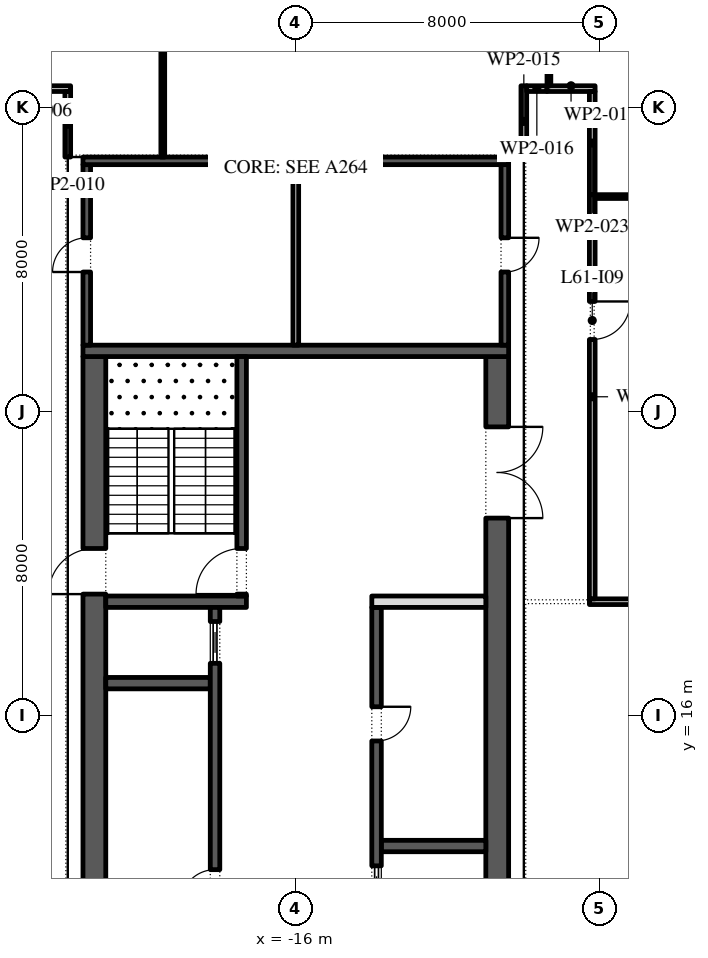
"""IFC4 building model, lengths in metres.
Left out: names, types, materials, properties, quantities, classifications, styles, units other than length and angle.
Written with IfcOpenShell. Run it as: python <this file> out.ifc"""

import sys

from ifc_helpers import new_model, si_unit, direction, frame, frame_2d, origin, place, context, subcontext, project, spatial, rectangle, extrude, element, fill, save


model = new_model("IFC4")
c1 = context("Model", 3, precision=1e-05, world=origin(), true_north=direction((0.0, 1.0)))
c2 = subcontext(c1, "Body", "Model", "MODEL_VIEW")
j1 = project(units=[si_unit("LENGTHUNIT", "METRE"), si_unit("PLANEANGLEUNIT", "RADIAN")], contexts=[c1])
p1 = place(None, origin())
s1 = spatial("IfcSite", under=j1, at=p1, CompositionType="ELEMENT")
p2 = place(p1, origin())
s2 = spatial("IfcBuilding", under=s1, at=p2, CompositionType="ELEMENT")
p3 = place(p2, frame((0.0, 0.0, 280.8)))
s3 = spatial("IfcBuildingStorey", under=s2, at=p3, CompositionType="ELEMENT", Elevation=280.8)
p4 = place(p3, frame((-21.359, 48.678, 0.0), z_axis=(0.0, 0.0, 1.0), x_axis=(-0.224949198343, -0.974370493275, 0.0)))
e1 = element("IfcWall", 1, at=p4, inside=s3, PredefinedType="STANDARD", context=c2, shape_type="SweptSolid", body=[
    extrude(rectangle(XDim=49.5, YDim=0.3, at=frame_2d((24.75, 0.0))), origin(), (0.0, 0.0, 1.0), 4.0),
])
p5 = place(p4, frame((1.157, 0.0, 0.45)))
e2 = element("IfcOpeningElement", 2, at=p5, cuts=e1, PredefinedType="OPENING", context=c2, shape_type="SweptSolid", body=[
    extrude(rectangle(XDim=4.5, YDim=3.05, at=frame_2d((2.25, 1.525))), frame((0.0, 0.16, 0.0), z_axis=(0.0, -1.0, 0.0), x_axis=(1.0, 0.0, 0.0)), (0.0, 0.0, 1.0), 0.32),
])
p6 = place(p4, frame((9.171, 0.0, 0.0)))
e3 = element("IfcOpeningElement", 3, at=p6, cuts=e1, PredefinedType="OPENING", context=c2, shape_type="SweptSolid", body=[
    extrude(rectangle(XDim=2.4, YDim=3.5, at=frame_2d((1.2, 1.75))), frame((0.0, 0.16, 0.0), z_axis=(0.0, -1.0, 0.0), x_axis=(1.0, 0.0, 0.0)), (0.0, 0.0, 1.0), 0.32),
])
p7 = place(p4, frame((15.236, 0.0, 0.45)))
e4 = element("IfcOpeningElement", 4, at=p7, cuts=e1, PredefinedType="OPENING", context=c2, shape_type="SweptSolid", body=[
    extrude(rectangle(XDim=4.5, YDim=3.05, at=frame_2d((2.25, 1.525))), frame((0.0, 0.16, 0.0), z_axis=(0.0, -1.0, 0.0), x_axis=(1.0, 0.0, 0.0)), (0.0, 0.0, 1.0), 0.32),
])
p8 = place(p4, frame((22.35, 0.0, 0.45)))
e5 = element("IfcOpeningElement", 5, at=p8, cuts=e1, PredefinedType="OPENING", context=c2, shape_type="SweptSolid", body=[
    extrude(rectangle(XDim=4.5, YDim=3.05, at=frame_2d((2.25, 1.525))), frame((0.0, 0.16, 0.0), z_axis=(0.0, -1.0, 0.0), x_axis=(1.0, 0.0, 0.0)), (0.0, 0.0, 1.0), 0.32),
])
p9 = place(p4, frame((29.464, 0.0, 0.45)))
e6 = element("IfcOpeningElement", 6, at=p9, cuts=e1, PredefinedType="OPENING", context=c2, shape_type="SweptSolid", body=[
    extrude(rectangle(XDim=4.5, YDim=3.05, at=frame_2d((2.25, 1.525))), frame((0.0, 0.16, 0.0), z_axis=(0.0, -1.0, 0.0), x_axis=(1.0, 0.0, 0.0)), (0.0, 0.0, 1.0), 0.32),
])
p10 = place(p4, frame((37.628, 0.0, 0.0)))
e7 = element("IfcOpeningElement", 7, at=p10, cuts=e1, PredefinedType="OPENING", context=c2, shape_type="SweptSolid", body=[
    extrude(rectangle(XDim=2.4, YDim=3.325, at=frame_2d((1.2, 1.663))), frame((0.0, 0.16, 0.0), z_axis=(0.0, -1.0, 0.0), x_axis=(1.0, 0.0, 0.0)), (0.0, 0.0, 1.0), 0.32),
])
p11 = place(p4, frame((43.693, 0.0, 0.45)))
e8 = element("IfcOpeningElement", 8, at=p11, cuts=e1, PredefinedType="OPENING", context=c2, shape_type="SweptSolid", body=[
    extrude(rectangle(XDim=4.5, YDim=2.825, at=frame_2d((2.25, 1.413))), frame((0.0, 0.16, 0.0), z_axis=(0.0, -1.0, 0.0), x_axis=(1.0, 0.0, 0.0)), (0.0, 0.0, 1.0), 0.32),
])
p12 = place(p3, frame((-21.3, -2.45, 0.0), z_axis=(0.0, 0.0, 1.0), x_axis=(0.0, 1.0, 0.0)))
e9 = element("IfcWall", 9, at=p12, inside=s3, PredefinedType="SHEAR", context=c2, shape_type="SweptSolid", body=[
    extrude(rectangle(XDim=27.9, YDim=0.6, at=frame_2d((13.95, 0.0))), origin(), (0.0, 0.0, 1.0), 4.0),
])
p13 = place(p12, frame((5.05, 0.0, 0.0)))
e10 = element("IfcOpeningElement", 10, at=p13, cuts=e9, PredefinedType="OPENING", context=c2, shape_type="SweptSolid", body=[
    extrude(rectangle(XDim=1.2, YDim=2.1, at=frame_2d((0.6, 1.05))), frame((0.0, 0.31, 0.0), z_axis=(0.0, -1.0, 0.0), x_axis=(1.0, 0.0, 0.0)), (0.0, 0.0, 1.0), 0.62),
])
p14 = place(p12, frame((21.65, 0.0, 0.0)))
e11 = element("IfcOpeningElement", 11, at=p14, cuts=e9, PredefinedType="OPENING", context=c2, shape_type="SweptSolid", body=[
    extrude(rectangle(XDim=1.2, YDim=2.1, at=frame_2d((0.6, 1.05))), frame((0.0, 0.31, 0.0), z_axis=(0.0, -1.0, 0.0), x_axis=(1.0, 0.0, 0.0)), (0.0, 0.0, 1.0), 0.62),
])
p15 = place(p3, frame((-10.7, -2.45, 0.0), z_axis=(0.0, 0.0, 1.0), x_axis=(0.0, 1.0, 0.0)))
e12 = element("IfcWall", 12, at=p15, inside=s3, PredefinedType="SHEAR", context=c2, shape_type="SweptSolid", body=[
    extrude(rectangle(XDim=27.9, YDim=0.6, at=frame_2d((13.95, 0.0))), origin(), (0.0, 0.0, 1.0), 4.0),
])
p16 = place(p15, frame((23.65, 0.0, 0.0)))
e13 = element("IfcOpeningElement", 13, at=p16, cuts=e12, PredefinedType="OPENING", context=c2, shape_type="SweptSolid", body=[
    extrude(rectangle(XDim=2.4, YDim=2.1, at=frame_2d((1.2, 1.05))), frame((0.0, 0.31, 0.0), z_axis=(0.0, -1.0, 0.0), x_axis=(1.0, 0.0, 0.0)), (0.0, 0.0, 1.0), 0.62),
])
p17 = place(p15, frame((1.087, 0.0, 0.0)))
e14 = element("IfcOpeningElement", 14, at=p17, cuts=e12, PredefinedType="OPENING", context=c2, shape_type="SweptSolid", body=[
    extrude(rectangle(XDim=0.9, YDim=2.1, at=frame_2d((0.45, 1.05))), frame((0.0, 0.31, 0.0), z_axis=(0.0, -1.0, 0.0), x_axis=(1.0, 0.0, 0.0)), (0.0, 0.0, 1.0), 0.62),
])
p18 = place(p15, frame((4.262, 0.0, 0.0)))
e15 = element("IfcOpeningElement", 15, at=p18, cuts=e12, PredefinedType="OPENING", context=c2, shape_type="SweptSolid", body=[
    extrude(rectangle(XDim=1.0, YDim=2.1, at=frame_2d((0.5, 1.05))), frame((0.0, 0.31, 0.0), z_axis=(0.0, -1.0, 0.0), x_axis=(1.0, 0.0, 0.0)), (0.0, 0.0, 1.0), 0.62),
])
p19 = place(p3, frame((-21.6, 25.6, 0.0), z_axis=(0.0, 0.0, 1.0), x_axis=(1.0, 0.0, 0.0)))
e16 = element("IfcWall", 16, at=p19, inside=s3, PredefinedType="SHEAR", context=c2, shape_type="SweptSolid", body=[
    extrude(rectangle(XDim=11.2, YDim=0.3, at=frame_2d((5.6, 0.0))), origin(), (0.0, 0.0, 1.0), 4.0),
])
p20 = place(p3, frame((-21.0, 19.0, 0.0), z_axis=(0.0, 0.0, 1.0), x_axis=(1.0, 0.0, 0.0)))
e17 = element("IfcWall", 17, at=p20, inside=s3, PredefinedType="SHEAR", context=c2, shape_type="SweptSolid", body=[
    extrude(rectangle(XDim=3.7, YDim=0.3, at=frame_2d((1.85, 0.0))), origin(), (0.0, 0.0, 1.0), 4.0),
])
p21 = place(p3, frame((-17.425, 19.15, 0.0), z_axis=(0.0, 0.0, 1.0), x_axis=(0.0, 1.0, 0.0)))
e18 = element("IfcWall", 18, at=p21, inside=s3, PredefinedType="SHEAR", context=c2, shape_type="SweptSolid", body=[
    extrude(rectangle(XDim=6.3, YDim=0.25, at=frame_2d((3.15, 0.0))), origin(), (0.0, 0.0, 1.0), 4.0),
])
p22 = place(p21, frame((0.05, 0.0, 0.0)))
e19 = element("IfcOpeningElement", 19, at=p22, cuts=e18, PredefinedType="OPENING", context=c2, shape_type="SweptSolid", body=[
    extrude(rectangle(XDim=1.2, YDim=2.1, at=frame_2d((0.6, 1.05))), frame((0.0, 0.135, 0.0), z_axis=(0.0, -1.0, 0.0), x_axis=(1.0, 0.0, 0.0)), (0.0, 0.0, 1.0), 0.27),
])
p23 = place(p3, frame((-21.0, 16.857, 0.0), z_axis=(0.0, 0.0, 1.0), x_axis=(1.0, 0.0, 0.0)))
e20 = element("IfcWall", 20, at=p23, inside=s3, PredefinedType="SHEAR", context=c2, shape_type="SweptSolid", body=[
    extrude(rectangle(XDim=2.75, YDim=0.3, at=frame_2d((1.375, 0.0))), origin(), (0.0, 0.0, 1.0), 4.0),
])
p24 = place(p3, frame((-18.125, 4.15, 0.0), z_axis=(0.0, 0.0, 1.0), x_axis=(0.0, 1.0, 0.0)))
e21 = element("IfcWall", 21, at=p24, inside=s3, PredefinedType="SHEAR", context=c2, shape_type="SweptSolid", body=[
    extrude(rectangle(XDim=14.7, YDim=0.25, at=frame_2d((7.35, 0.0))), origin(), (0.0, 0.0, 1.0), 4.0),
])
p25 = place(p24, frame((6.9, 0.0, 0.0)))
e22 = element("IfcOpeningElement", 22, at=p25, cuts=e21, PredefinedType="OPENING", context=c2, shape_type="SweptSolid", body=[
    extrude(rectangle(XDim=0.9, YDim=2.1, at=frame_2d((0.45, 1.05))), frame((0.0, 0.135, 0.0), z_axis=(0.0, -1.0, 0.0), x_axis=(1.0, 0.0, 0.0)), (0.0, 0.0, 1.0), 0.27),
])
p26 = place(p24, frame((0.371, 0.0, 0.0)))
e23 = element("IfcOpeningElement", 23, at=p26, cuts=e21, PredefinedType="OPENING", context=c2, shape_type="SweptSolid", body=[
    extrude(rectangle(XDim=1.1, YDim=2.1, at=frame_2d((0.55, 1.05))), frame((0.0, 0.135, 0.0), z_axis=(0.0, -1.0, 0.0), x_axis=(1.0, 0.0, 0.0)), (0.0, 0.0, 1.0), 0.27),
])
p27 = place(p24, frame((13.229, 0.0, 0.0)))
e24 = element("IfcOpeningElement", 24, at=p27, cuts=e21, PredefinedType="OPENING", context=c2, shape_type="SweptSolid", body=[
    extrude(rectangle(XDim=1.1, YDim=2.1, at=frame_2d((0.55, 1.05))), frame((0.0, 0.135, 0.0), z_axis=(0.0, -1.0, 0.0), x_axis=(1.0, 0.0, 0.0)), (0.0, 0.0, 1.0), 0.27),
])
p28 = place(p3, frame((-13.75, 12.571, 0.0), z_axis=(0.0, 0.0, 1.0), x_axis=(1.0, 0.0, 0.0)))
e25 = element("IfcWall", 25, at=p28, inside=s3, PredefinedType="SHEAR", context=c2, shape_type="SweptSolid", body=[
    extrude(rectangle(XDim=2.75, YDim=0.3, at=frame_2d((1.375, 0.0))), origin(), (0.0, 0.0, 1.0), 4.0),
])
p29 = place(p3, frame((-13.875, -2.45, 0.0), z_axis=(0.0, 0.0, 1.0), x_axis=(0.0, 1.0, 0.0)))
e26 = element("IfcWall", 26, at=p29, inside=s3, PredefinedType="SHEAR", context=c2, shape_type="SweptSolid", body=[
    extrude(rectangle(XDim=21.3, YDim=0.25, at=frame_2d((10.65, 0.0))), origin(), (0.0, 0.0, 1.0), 4.0),
])
p30 = place(p29, frame((17.786, 0.0, 0.0)))
e27 = element("IfcOpeningElement", 27, at=p30, cuts=e26, PredefinedType="OPENING", context=c2, shape_type="SweptSolid", body=[
    extrude(rectangle(XDim=0.9, YDim=2.1, at=frame_2d((0.45, 1.05))), frame((0.0, 0.135, 0.0), z_axis=(0.0, -1.0, 0.0), x_axis=(1.0, 0.0, 0.0)), (0.0, 0.0, 1.0), 0.27),
])
p31 = place(p29, frame((6.971, 0.0, 0.0)))
e28 = element("IfcOpeningElement", 28, at=p31, cuts=e26, PredefinedType="OPENING", context=c2, shape_type="SweptSolid", body=[
    extrude(rectangle(XDim=1.1, YDim=2.1, at=frame_2d((0.55, 1.05))), frame((0.0, 0.135, 0.0), z_axis=(0.0, -1.0, 0.0), x_axis=(1.0, 0.0, 0.0)), (0.0, 0.0, 1.0), 0.27),
])
p32 = place(p29, frame((9.114, 0.0, 0.0)))
e29 = element("IfcOpeningElement", 29, at=p32, cuts=e26, PredefinedType="OPENING", context=c2, shape_type="SweptSolid", body=[
    extrude(rectangle(XDim=1.1, YDim=2.1, at=frame_2d((0.55, 1.05))), frame((0.0, 0.135, 0.0), z_axis=(0.0, -1.0, 0.0), x_axis=(1.0, 0.0, 0.0)), (0.0, 0.0, 1.0), 0.27),
])
p33 = place(p29, frame((11.257, 0.0, 0.0)))
e30 = element("IfcOpeningElement", 30, at=p33, cuts=e26, PredefinedType="OPENING", context=c2, shape_type="SweptSolid", body=[
    extrude(rectangle(XDim=1.1, YDim=2.1, at=frame_2d((0.55, 1.05))), frame((0.0, 0.135, 0.0), z_axis=(0.0, -1.0, 0.0), x_axis=(1.0, 0.0, 0.0)), (0.0, 0.0, 1.0), 0.27),
])
p34 = place(p29, frame((13.4, 0.0, 0.0)))
e31 = element("IfcOpeningElement", 31, at=p34, cuts=e26, PredefinedType="OPENING", context=c2, shape_type="SweptSolid", body=[
    extrude(rectangle(XDim=1.1, YDim=2.1, at=frame_2d((0.55, 1.05))), frame((0.0, 0.135, 0.0), z_axis=(0.0, -1.0, 0.0), x_axis=(1.0, 0.0, 0.0)), (0.0, 0.0, 1.0), 0.27),
])
p35 = place(p3, frame((-14.0, 19.0, 0.0), z_axis=(0.0, 0.0, 1.0), x_axis=(1.0, 0.0, 0.0)))
e32 = element("IfcWall", 32, at=p35, inside=s3, PredefinedType="PARTITIONING", context=c2, shape_type="SweptSolid", body=[
    extrude(rectangle(XDim=3.0, YDim=0.3, at=frame_2d((1.5, 0.0))), origin(), (0.0, 0.0, 1.0), 4.0),
])
p36 = place(p3, frame((-21.5, 25.75, 0.0), z_axis=(0.0, 0.0, 1.0), x_axis=(0.0, 1.0, 0.0)))
e33 = element("IfcWall", 33, at=p36, inside=s3, PredefinedType="SHEAR", context=c2, shape_type="SweptSolid", body=[
    extrude(rectangle(XDim=4.75, YDim=0.2, at=frame_2d((2.375, 0.0))), origin(), (0.0, 0.0, 1.0), 4.0),
])
p37 = place(p36, frame((1.925, 0.0, 0.0)))
e34 = element("IfcOpeningElement", 34, at=p37, cuts=e33, PredefinedType="OPENING", context=c2, shape_type="SweptSolid", body=[
    extrude(rectangle(XDim=0.9, YDim=2.1, at=frame_2d((0.45, 1.05))), frame((0.0, 0.11, 0.0), z_axis=(0.0, -1.0, 0.0), x_axis=(1.0, 0.0, 0.0)), (0.0, 0.0, 1.0), 0.22),
])
p38 = place(p3, frame((-10.5, 25.75, 0.0), z_axis=(0.0, 0.0, 1.0), x_axis=(0.0, 1.0, 0.0)))
e35 = element("IfcWall", 35, at=p38, inside=s3, PredefinedType="SHEAR", context=c2, shape_type="SweptSolid", body=[
    extrude(rectangle(XDim=4.75, YDim=0.2, at=frame_2d((2.375, 0.0))), origin(), (0.0, 0.0, 1.0), 4.0),
])
p39 = place(p38, frame((1.925, 0.0, 0.0)))
e36 = element("IfcOpeningElement", 36, at=p39, cuts=e35, PredefinedType="OPENING", context=c2, shape_type="SweptSolid", body=[
    extrude(rectangle(XDim=0.9, YDim=2.1, at=frame_2d((0.45, 1.05))), frame((0.0, 0.11, 0.0), z_axis=(0.0, -1.0, 0.0), x_axis=(1.0, 0.0, 0.0)), (0.0, 0.0, 1.0), 0.22),
])
p40 = place(p3, frame((-21.6, 30.6, 0.0), z_axis=(0.0, 0.0, 1.0), x_axis=(1.0, 0.0, 0.0)))
e37 = element("IfcWall", 37, at=p40, inside=s3, PredefinedType="SHEAR", context=c2, shape_type="SweptSolid", body=[
    extrude(rectangle(XDim=11.2, YDim=0.2, at=frame_2d((5.6, 0.0))), origin(), (0.0, 0.0, 1.0), 4.0),
])
p41 = place(p3, frame((-16.0, 25.75, 0.0), z_axis=(0.0, 0.0, 1.0), x_axis=(0.0, 1.0, 0.0)))
e38 = element("IfcWall", 38, at=p41, inside=s3, PredefinedType="PARTITIONING", context=c2, shape_type="SweptSolid", body=[
    extrude(rectangle(XDim=4.75, YDim=0.15, at=frame_2d((2.375, 0.0))), origin(), (0.0, 0.0, 1.0), 4.0),
])
p42 = place(p3, frame((-23.8, 32.5, 0.0), z_axis=(0.0, 0.0, 1.0), x_axis=(1.0, 0.0, 0.0)))
e39 = element("IfcWall", 39, at=p42, inside=s3, PredefinedType="PARTITIONING", context=c2, shape_type="SweptSolid", body=[
    extrude(rectangle(XDim=1.875, YDim=0.15, at=frame_2d((0.938, 0.0))), origin(), (0.0, 0.0, 1.0), 4.0),
])
p43 = place(p3, frame((-22.0, 32.425, 0.0), z_axis=(0.0, 0.0, 1.0), x_axis=(0.0, -1.0, 0.0)))
e40 = element("IfcWall", 40, at=p43, inside=s3, PredefinedType="PARTITIONING", context=c2, shape_type="SweptSolid", body=[
    extrude(rectangle(XDim=1.725, YDim=0.15, at=frame_2d((0.863, 0.0))), origin(), (0.0, 0.0, 1.0), 4.0),
])
p44 = place(p3, frame((-19.5, 41.95, 0.0), z_axis=(0.0, 0.0, 1.0), x_axis=(0.0, -1.0, 0.0)))
e41 = element("IfcWall", 41, at=p44, inside=s3, PredefinedType="PARTITIONING", context=c2, shape_type="SweptSolid", body=[
    extrude(rectangle(XDim=11.25, YDim=0.1, at=frame_2d((5.625, 0.0))), origin(), (0.0, 0.0, 1.0), 4.0),
])
p45 = place(p3, frame((-10.0, 30.7, 0.0), z_axis=(0.0, 0.0, 1.0), x_axis=(0.0, 1.0, 0.0)))
e42 = element("IfcWall", 42, at=p45, inside=s3, PredefinedType="PARTITIONING", context=c2, shape_type="SweptSolid", body=[
    extrude(rectangle(XDim=1.875, YDim=0.15, at=frame_2d((0.938, 0.0))), origin(), (0.0, 0.0, 1.0), 4.0),
])
p46 = place(p3, frame((-9.925, 32.5, 0.0), z_axis=(0.0, 0.0, 1.0), x_axis=(1.0, 0.0, 0.0)))
e43 = element("IfcWall", 43, at=p46, inside=s3, PredefinedType="PARTITIONING", context=c2, shape_type="SweptSolid", body=[
    extrude(rectangle(XDim=0.535, YDim=0.15, at=frame_2d((0.268, 0.0))), origin(), (0.0, 0.0, 1.0), 4.0),
])
p47 = place(p3, frame((-9.39, 32.5, 0.0), z_axis=(0.0, 0.0, 1.0), x_axis=(1.0, 0.0, 0.0)))
e44 = element("IfcWall", 44, at=p47, inside=s3, PredefinedType="PARTITIONING", context=c2, shape_type="SweptSolid", body=[
    extrude(rectangle(XDim=1.265, YDim=0.15, at=frame_2d((0.632, 0.0))), origin(), (0.0, 0.0, 1.0), 4.0),
])
p48 = place(p3, frame((-9.34, 41.95, 0.0), z_axis=(0.0, 0.0, 1.0), x_axis=(0.0, -1.0, 0.0)))
e45 = element("IfcWall", 45, at=p48, inside=s3, PredefinedType="PARTITIONING", context=c2, shape_type="SweptSolid", body=[
    extrude(rectangle(XDim=9.375, YDim=0.1, at=frame_2d((4.688, 0.0))), origin(), (0.0, 0.0, 1.0), 4.0),
])
p49 = place(p3, frame((-8.275, 19.0, 0.0), z_axis=(0.0, 0.0, 1.0), x_axis=(1.0, 0.0, 0.0)))
e46 = element("IfcWall", 46, at=p49, inside=s3, PredefinedType="PARTITIONING", context=c2, shape_type="SweptSolid", body=[
    extrude(rectangle(XDim=7.36, YDim=0.15, at=frame_2d((3.68, 0.0))), origin(), (0.0, 0.0, 1.0), 4.0),
])
p50 = place(p3, frame((-8.2, 29.71, 0.0), z_axis=(0.0, 0.0, 1.0), x_axis=(0.0, -1.0, 0.0)))
e47 = element("IfcWall", 47, at=p50, inside=s3, PredefinedType="PARTITIONING", context=c2, shape_type="SweptSolid", body=[
    extrude(rectangle(XDim=10.635, YDim=0.15, at=frame_2d((5.317, 0.0))), origin(), (0.0, 0.0, 1.0), 4.0),
])
p51 = place(p50, frame((2.81, 0.0, 0.0)))
e48 = element("IfcOpeningElement", 48, at=p51, cuts=e47, PredefinedType="OPENING", context=c2, shape_type="SweptSolid", body=[
    extrude(rectangle(XDim=1.0, YDim=2.1, at=frame_2d((0.5, 1.05))), frame((0.0, 0.085, 0.0), z_axis=(0.0, -1.0, 0.0), x_axis=(1.0, 0.0, 0.0)), (0.0, 0.0, 1.0), 0.17),
])
p52 = place(p3, frame((-8.125, 29.66, 0.0), z_axis=(0.0, 0.0, 1.0), x_axis=(1.0, 0.0, 0.0)))
e49 = element("IfcWall", 49, at=p52, inside=s3, PredefinedType="PARTITIONING", context=c2, shape_type="SweptSolid", body=[
    extrude(rectangle(XDim=7.21, YDim=0.1, at=frame_2d((3.605, 0.0))), origin(), (0.0, 0.0, 1.0), 4.0),
])
p53 = place(p3, frame((-8.2, 32.425, 0.0), z_axis=(0.0, 0.0, 1.0), x_axis=(0.0, -1.0, 0.0)))
e50 = element("IfcWall", 50, at=p53, inside=s3, PredefinedType="PARTITIONING", context=c2, shape_type="SweptSolid", body=[
    extrude(rectangle(XDim=2.715, YDim=0.15, at=frame_2d((1.357, 0.0))), origin(), (0.0, 0.0, 1.0), 4.0),
])
p54 = place(p25, origin())
e51 = element("IfcDoor", 51, at=p54, inside=s3, OperationType="SINGLE_SWING_RIGHT", PredefinedType="DOOR", context=c2, shape_type="SweptSolid", body=[
    extrude(rectangle(XDim=0.9, YDim=2.1, at=frame_2d((0.45, 1.05))), frame((0.0, 0.125, 0.0), z_axis=(0.0, -1.0, 0.0), x_axis=(1.0, 0.0, 0.0)), (0.0, 0.0, 1.0), 0.05),
])
fill(e22, e51)
p55 = place(p27, origin())
e52 = element("IfcDoor", 52, at=p55, inside=s3, OperationType="SLIDING_TO_LEFT", PredefinedType="DOOR", context=c2, shape_type="SweptSolid", body=[
    extrude(rectangle(XDim=1.1, YDim=2.1, at=frame_2d((0.55, 1.05))), frame((0.0, 0.025, 0.0), z_axis=(0.0, -1.0, 0.0), x_axis=(1.0, 0.0, 0.0)), (0.0, 0.0, 1.0), 0.05),
])
fill(e24, e52)
p56 = place(p30, frame((0.9, -0.2, 0.0), z_axis=(0.0, 0.0, 1.0), x_axis=(-1.0, 0.0, 0.0)))
e53 = element("IfcDoor", 53, at=p56, inside=s3, OperationType="SINGLE_SWING_RIGHT", PredefinedType="DOOR", context=c2, shape_type="SweptSolid", body=[
    extrude(rectangle(XDim=0.9, YDim=2.1, at=frame_2d((0.45, 1.05))), frame((0.0, -0.075, 0.0), z_axis=(0.0, -1.0, 0.0), x_axis=(1.0, 0.0, 0.0)), (0.0, 0.0, 1.0), 0.05),
])
fill(e27, e53)
p57 = place(p34, origin())
e54 = element("IfcDoor", 54, at=p57, inside=s3, OperationType="SLIDING_TO_LEFT", PredefinedType="DOOR", context=c2, shape_type="SweptSolid", body=[
    extrude(rectangle(XDim=1.1, YDim=2.1, at=frame_2d((0.55, 1.05))), frame((0.0, 0.025, 0.0), z_axis=(0.0, -1.0, 0.0), x_axis=(1.0, 0.0, 0.0)), (0.0, 0.0, 1.0), 0.05),
])
fill(e31, e54)
p58 = place(p16, frame((2.4, 0.0, 0.0), z_axis=(0.0, 0.0, 1.0), x_axis=(-1.0, 0.0, 0.0)))
e55 = element("IfcDoor", 55, at=p58, inside=s3, OperationType="DOUBLE_DOOR_SINGLE_SWING", PredefinedType="DOOR", context=c2, shape_type="SweptSolid", body=[
    extrude(rectangle(XDim=2.4, YDim=2.1, at=frame_2d((1.2, 1.05))), frame((0.0, 0.025, 0.0), z_axis=(0.0, -1.0, 0.0), x_axis=(1.0, 0.0, 0.0)), (0.0, 0.0, 1.0), 0.05),
])
fill(e13, e55)
p59 = place(p22, origin())
e56 = element("IfcDoor", 56, at=p59, inside=s3, OperationType="SINGLE_SWING_RIGHT", PredefinedType="DOOR", context=c2, shape_type="SweptSolid", body=[
    extrude(rectangle(XDim=1.2, YDim=2.1, at=frame_2d((0.6, 1.05))), frame((0.0, 0.025, 0.0), z_axis=(0.0, -1.0, 0.0), x_axis=(1.0, 0.0, 0.0)), (0.0, 0.0, 1.0), 0.05),
])
fill(e19, e56)
p60 = place(p14, origin())
e57 = element("IfcDoor", 57, at=p60, inside=s3, OperationType="SINGLE_SWING_RIGHT", PredefinedType="DOOR", context=c2, shape_type="SweptSolid", body=[
    extrude(rectangle(XDim=1.2, YDim=2.1, at=frame_2d((0.6, 1.05))), frame((0.0, 0.025, 0.0), z_axis=(0.0, -1.0, 0.0), x_axis=(1.0, 0.0, 0.0)), (0.0, 0.0, 1.0), 0.05),
])
fill(e11, e57)
p61 = place(p37, origin())
e58 = element("IfcDoor", 58, at=p61, inside=s3, OperationType="SINGLE_SWING_RIGHT", PredefinedType="DOOR", context=c2, shape_type="SweptSolid", body=[
    extrude(rectangle(XDim=0.9, YDim=2.1, at=frame_2d((0.45, 1.05))), frame((0.0, -0.05, 0.0), z_axis=(0.0, -1.0, 0.0), x_axis=(1.0, 0.0, 0.0)), (0.0, 0.0, 1.0), 0.05),
])
fill(e34, e58)
p62 = place(p39, frame((0.9, 0.15, 0.0), z_axis=(0.0, 0.0, 1.0), x_axis=(-1.0, 0.0, 0.0)))
e59 = element("IfcDoor", 59, at=p62, inside=s3, OperationType="SINGLE_SWING_RIGHT", PredefinedType="DOOR", context=c2, shape_type="SweptSolid", body=[
    extrude(rectangle(XDim=0.9, YDim=2.1, at=frame_2d((0.45, 1.05))), frame((0.0, 0.1, 0.0), z_axis=(0.0, -1.0, 0.0), x_axis=(1.0, 0.0, 0.0)), (0.0, 0.0, 1.0), 0.05),
])
fill(e36, e59)
p63 = place(p51, origin())
e60 = element("IfcDoor", 60, at=p63, inside=s3, OperationType="SINGLE_SWING_RIGHT", PredefinedType="DOOR", context=c2, shape_type="SweptSolid", body=[
    extrude(rectangle(XDim=1.0, YDim=2.1, at=frame_2d((0.5, 1.05))), frame((0.0, 0.025, 0.0), z_axis=(0.0, -1.0, 0.0), x_axis=(1.0, 0.0, 0.0)), (0.0, 0.0, 1.0), 0.05),
])
fill(e48, e60)
save(model, sys.argv[1])
